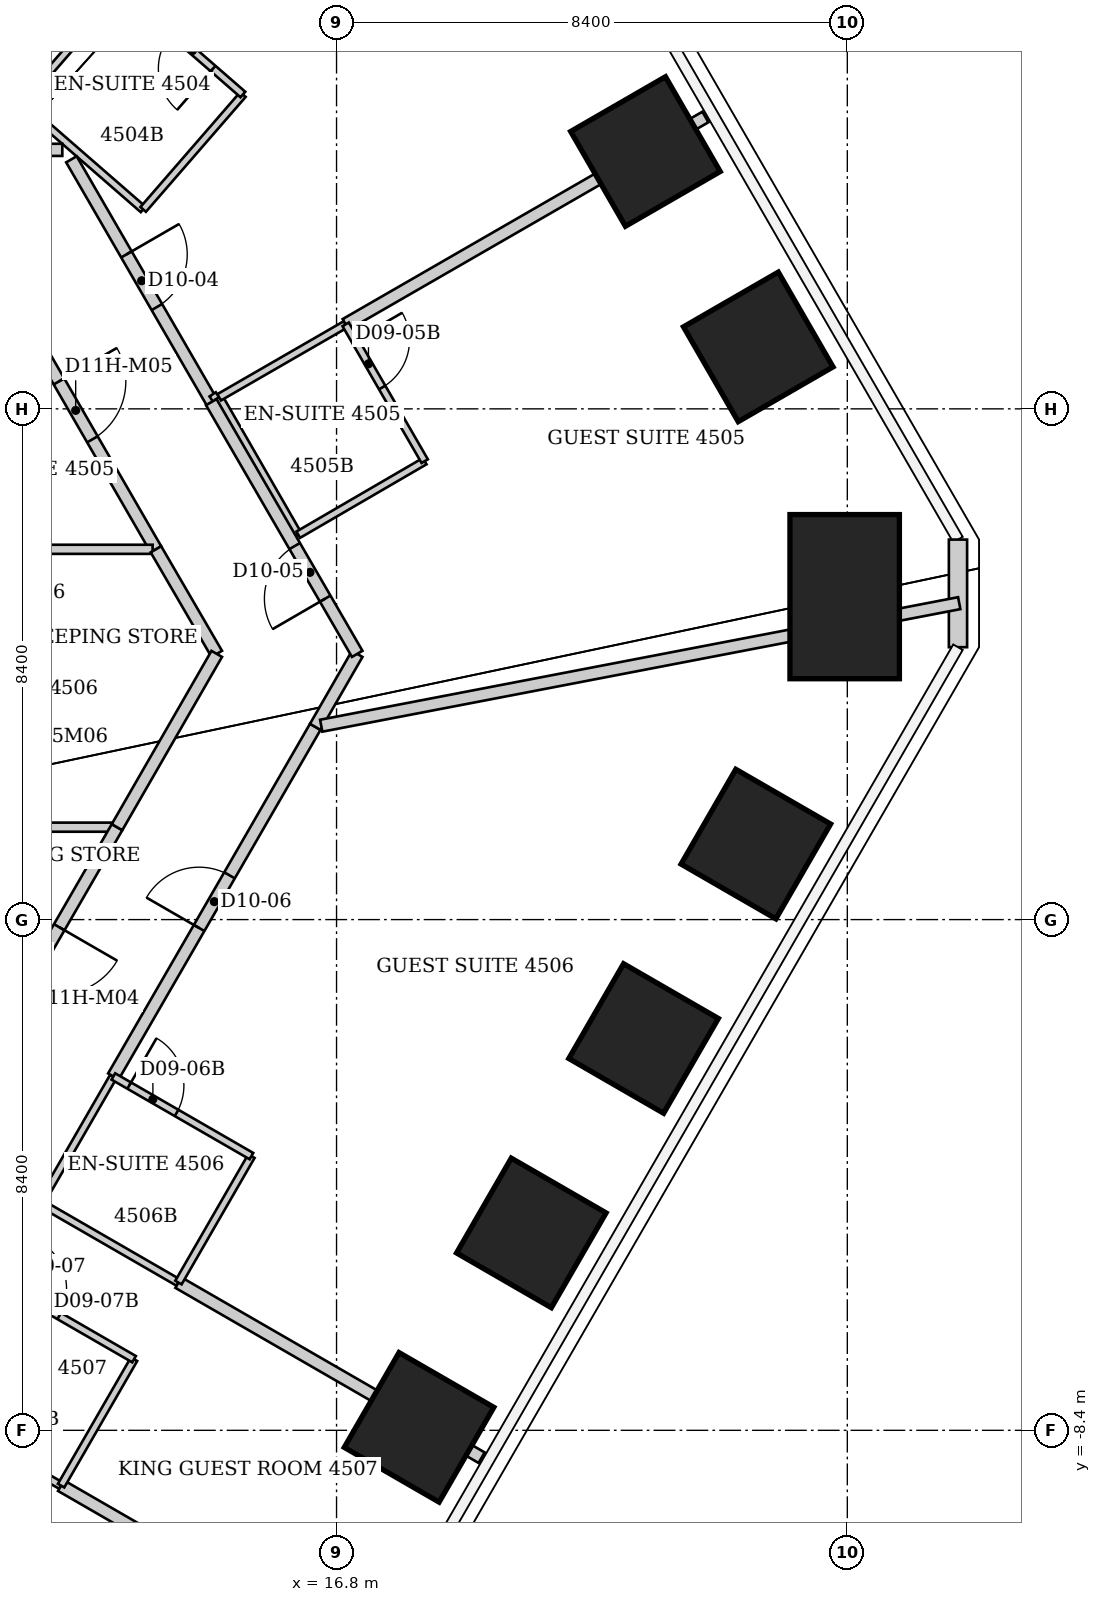
"""IFC4 building model, lengths in metres.
Left out: names, types, materials, properties, quantities, classifications, styles, units other than length and angle.
Written with IfcOpenShell. Run it as: python <this file> out.ifc"""

import sys

from ifc_helpers import new_model, si_unit, direction, frame, frame_2d, origin, origin_2d, place, context, subcontext, project, spatial, rectangle, extrude, element, fill, save


model = new_model("IFC4")
c1 = context("Model", 3, precision=1e-05, world=origin(), true_north=direction((0.0, 1.0)))
c2 = subcontext(c1, "Body", "Model", "MODEL_VIEW")
j1 = project(units=[si_unit("LENGTHUNIT", "METRE"), si_unit("PLANEANGLEUNIT", "RADIAN")], contexts=[c1])
p1 = place(None, origin())
s1 = spatial("IfcSite", under=j1, at=p1, CompositionType="ELEMENT")
p2 = place(p1, origin())
s2 = spatial("IfcBuilding", under=s1, at=p2, CompositionType="ELEMENT")
p3 = place(p2, frame((0.0, 0.0, 183.2)))
s3 = spatial("IfcBuildingStorey", under=s2, at=p3, CompositionType="ELEMENT", Elevation=183.2)
for number, where, z_axis, x_axis in (
    (1, (21.88, 12.633, 0.0), (0.0, 0.0, 1.0), (0.866, 0.5, 0.0)),
    (2, (23.735, 9.419, 0.0), (0.0, 0.0, 1.0), (0.866, 0.5, 0.0)),
):
    element("IfcColumn", number, at=place(p3, frame(where, z_axis=z_axis, x_axis=x_axis)), inside=s3, PredefinedType="COLUMN", context=c2, shape_type="SweptSolid", body=[
        extrude(rectangle(XDim=1.8, YDim=1.8, at=origin_2d()), origin(), (0.0, 0.0, 1.0), 3.8),
    ])
p4 = place(p3, frame((25.156, 5.311, 0.0), z_axis=(0.0, 0.0, 1.0), x_axis=(1.0, 0.0, 0.0)))
e3 = element("IfcColumn", 3, at=p4, inside=s3, PredefinedType="COLUMN", context=c2, shape_type="SweptSolid", body=[
    extrude(rectangle(XDim=1.8, YDim=2.7, at=origin_2d()), origin(), (0.0, 0.0, 1.0), 3.8),
])
for number, where, z_axis, x_axis in (
    (4, (23.696, 1.242, 0.0), (0.0, 0.0, 1.0), (0.866, -0.5, 0.0)),
    (5, (21.85, -1.956, 0.0), (0.0, 0.0, 1.0), (0.866, -0.5, 0.0)),
    (6, (20.003, -5.153, 0.0), (0.0, 0.0, 1.0), (0.866, -0.5, 0.0)),
    (7, (18.157, -8.351, 0.0), (0.0, 0.0, 1.0), (0.866, -0.5, 0.0)),
):
    element("IfcColumn", number, at=place(p3, frame(where, z_axis=z_axis, x_axis=x_axis)), inside=s3, PredefinedType="COLUMN", context=c2, shape_type="SweptSolid", body=[
        extrude(rectangle(XDim=1.8, YDim=1.8, at=origin_2d()), origin(), (0.0, 0.0, 1.0), 3.8),
    ])
p5 = place(p3, frame((27.02, 6.25, 0.0), z_axis=(0.0, 0.0, 1.0), x_axis=(0.0, -1.0, 0.0)))
e8 = element("IfcWall", 8, at=p5, inside=s3, PredefinedType="SOLIDWALL", context=c2, shape_type="SweptSolid", body=[
    extrude(rectangle(XDim=1.77, YDim=0.3, at=frame_2d((0.885, 0.0))), origin(), (0.0, 0.0, 1.0), 3.64),
])
p6 = place(p3, frame((10.0, -8.0, 0.0), z_axis=(0.0, 0.0, 1.0), x_axis=(0.866010296064, -0.500026166427, 0.0)))
e9 = element("IfcWall", 9, at=p6, inside=s3, PredefinedType="PARTITIONING", context=c2, shape_type="SweptSolid", body=[
    extrude(rectangle(XDim=2.621, YDim=0.12, at=frame_2d((1.311, 0.0))), origin(), (0.0, 0.0, 1.0), 3.038),
])
p7 = place(p3, frame((10.55, 1.52, 0.0), z_axis=(0.0, 0.0, 1.0), x_axis=(1.0, 0.0, 0.0)))
e10 = element("IfcWall", 10, at=p7, inside=s3, PredefinedType="PARTITIONING", context=c2, shape_type="SweptSolid", body=[
    extrude(rectangle(XDim=2.585, YDim=0.15, at=frame_2d((1.292, 0.0))), origin(), (0.0, 0.0, 1.0), 3.64),
])
p8 = place(p3, frame((11.19, 10.66, 0.0), z_axis=(0.0, 0.0, 1.0), x_axis=(0.500248310865, -0.865881993967, 0.0)))
e11 = element("IfcWall", 11, at=p8, inside=s3, PredefinedType="PARTITIONING", context=c2, shape_type="SweptSolid", body=[
    extrude(rectangle(XDim=5.278, YDim=0.2, at=frame_2d((2.639, 0.0))), origin(), (0.0, 0.0, 1.0), 3.64),
])
p9 = place(p8, frame((2.089, 0.0, 0.0)))
e12 = element("IfcOpeningElement", 12, at=p9, cuts=e11, PredefinedType="OPENING", context=c2, shape_type="SweptSolid", body=[
    extrude(rectangle(XDim=1.1, YDim=2.2, at=frame_2d((0.55, 1.1))), frame((0.0, 0.1, 0.0), z_axis=(0.0, -1.0, 0.0), x_axis=(1.0, 0.0, 0.0)), (0.0, 0.0, 1.0), 0.2),
])
p10 = place(p3, frame((11.62, 13.42, 0.0), z_axis=(0.0, 0.0, 1.0), x_axis=(0.655335308977, 0.755338091723, 0.0)))
e13 = element("IfcWall", 13, at=p10, inside=s3, PredefinedType="PARTITIONING", context=c2, shape_type="SweptSolid", body=[
    extrude(rectangle(XDim=2.502, YDim=0.12, at=frame_2d((1.251, 0.0))), origin(), (0.0, 0.0, 1.0), 3.64),
])
p11 = place(p3, frame((11.62, 13.42, 0.0), z_axis=(0.0, 0.0, 1.0), x_axis=(0.754444902764, -0.656363381591, 0.0)))
e14 = element("IfcWall", 14, at=p11, inside=s3, PredefinedType="PARTITIONING", context=c2, shape_type="SweptSolid", body=[
    extrude(rectangle(XDim=2.651, YDim=0.12, at=frame_2d((1.325, 0.0))), origin(), (0.0, 0.0, 1.0), 3.64),
])
p12 = place(p3, frame((11.93, -4.66, 0.0), z_axis=(0.0, 0.0, 1.0), x_axis=(0.499737123639, 0.866177122335, 0.0)))
e15 = element("IfcWall", 15, at=p12, inside=s3, PredefinedType="PARTITIONING", context=c2, shape_type="SweptSolid", body=[
    extrude(rectangle(XDim=2.401, YDim=0.12, at=frame_2d((1.201, 0.0))), origin(), (0.0, 0.0, 1.0), 3.64),
])
p13 = place(p3, frame((11.93, -4.66, 0.0), z_axis=(0.0, 0.0, 1.0), x_axis=(0.865969958829, -0.500096021185, 0.0)))
e16 = element("IfcWall", 16, at=p13, inside=s3, PredefinedType="PARTITIONING", context=c2, shape_type="SweptSolid", body=[
    extrude(rectangle(XDim=2.621, YDim=0.12, at=frame_2d((1.311, 0.0))), origin(), (0.0, 0.0, 1.0), 3.038),
])
p14 = place(p3, frame((12.27, -9.311, 0.0), z_axis=(0.0, 0.0, 1.0), x_axis=(0.865985044037, -0.500069898618, 0.0)))
e17 = element("IfcWall", 17, at=p14, inside=s3, PredefinedType="PARTITIONING", context=c2, shape_type="SweptSolid", body=[
    extrude(rectangle(XDim=5.758, YDim=0.2, at=frame_2d((2.879, 0.0))), origin(), (0.0, 0.0, 1.0), 3.038),
])
p15 = place(p3, frame((12.27, -9.31, 0.0), z_axis=(0.0, 0.0, 1.0), x_axis=(0.499693115345, 0.866202511239, 0.0)))
e18 = element("IfcWall", 18, at=p15, inside=s3, PredefinedType="PARTITIONING", context=c2, shape_type="SweptSolid", body=[
    extrude(rectangle(XDim=2.401, YDim=0.12, at=frame_2d((1.201, 0.0))), origin(), (0.0, 0.0, 1.0), 3.64),
])
p16 = place(p3, frame((12.29, 12.66, 0.0), z_axis=(0.0, 0.0, 1.0), x_axis=(-1.0, 0.0, 0.0)))
e19 = element("IfcWall", 19, at=p16, inside=s3, PredefinedType="PARTITIONING", context=c2, shape_type="SweptSolid", body=[
    extrude(rectangle(XDim=1.33, YDim=0.2, at=frame_2d((0.665, 0.0))), origin(), (0.0, 0.0, 1.0), 3.64),
])
p17 = place(p3, frame((12.44, 12.504, 0.0), z_axis=(0.0, 0.0, 1.0), x_axis=(0.500616963614, -0.865668906535, 0.0)))
e20 = element("IfcWall", 20, at=p17, inside=s3, PredefinedType="PARTITIONING", context=c2, shape_type="SweptSolid", body=[
    extrude(rectangle(XDim=4.614, YDim=0.2, at=frame_2d((2.307, 0.0))), origin(), (0.0, 0.0, 1.0), 3.64),
])
p18 = place(p17, frame((1.807, 0.0, 0.0)))
e21 = element("IfcOpeningElement", 21, at=p18, cuts=e20, PredefinedType="OPENING", context=c2, shape_type="SweptSolid", body=[
    extrude(rectangle(XDim=1.0, YDim=2.13, at=frame_2d((0.5, 1.065))), frame((0.0, 0.1, 0.0), z_axis=(0.0, -1.0, 0.0), x_axis=(1.0, 0.0, 0.0)), (0.0, 0.0, 1.0), 0.2),
])
p19 = place(p3, frame((13.13, -2.58, 0.0), z_axis=(0.0, 0.0, 1.0), x_axis=(0.500034373799, 0.866005557153, 0.0)))
e22 = element("IfcWall", 22, at=p19, inside=s3, PredefinedType="PARTITIONING", context=c2, shape_type="SweptSolid", body=[
    extrude(rectangle(XDim=6.64, YDim=0.2, at=frame_2d((3.32, 0.0))), origin(), (0.0, 0.0, 1.0), 3.64),
])
p20 = place(p19, frame((2.82, 0.0, 0.0)))
e23 = element("IfcOpeningElement", 23, at=p20, cuts=e22, PredefinedType="OPENING", context=c2, shape_type="SweptSolid", body=[
    extrude(rectangle(XDim=1.0, YDim=2.13, at=frame_2d((0.5, 1.065))), frame((0.0, 0.1, 0.0), z_axis=(0.0, -1.0, 0.0), x_axis=(1.0, 0.0, 0.0)), (0.0, 0.0, 1.0), 0.2),
])
p21 = place(p3, frame((13.19, 1.52, 0.0), z_axis=(0.0, 0.0, 1.0), x_axis=(-0.500193590286, -0.865913605527, 0.0)))
e24 = element("IfcWall", 24, at=p21, inside=s3, PredefinedType="PARTITIONING", context=c2, shape_type="SweptSolid", body=[
    extrude(rectangle(XDim=5.278, YDim=0.2, at=frame_2d((2.639, 0.0))), origin(), (0.0, 0.0, 1.0), 3.64),
])
p22 = place(p21, frame((1.9, 0.0, 0.0)))
e25 = element("IfcOpeningElement", 25, at=p22, cuts=e24, PredefinedType="OPENING", context=c2, shape_type="SweptSolid", body=[
    extrude(rectangle(XDim=1.1, YDim=2.2, at=frame_2d((0.55, 1.1))), frame((0.0, 0.1, 0.0), z_axis=(0.0, -1.0, 0.0), x_axis=(1.0, 0.0, 0.0)), (0.0, 0.0, 1.0), 0.2),
])
p23 = place(p3, frame((13.47, -7.23, 0.0), z_axis=(0.0, 0.0, 1.0), x_axis=(-0.866114241029, 0.499846097802, 0.0)))
e26 = element("IfcWall", 26, at=p23, inside=s3, PredefinedType="PARTITIONING", context=c2, shape_type="SweptSolid", body=[
    extrude(rectangle(XDim=2.621, YDim=0.12, at=frame_2d((1.311, 0.0))), origin(), (0.0, 0.0, 1.0), 3.64),
])
p24 = place(p23, frame((1.421, 0.0, 0.0)))
e27 = element("IfcOpeningElement", 27, at=p24, cuts=e26, PredefinedType="OPENING", context=c2, shape_type="SweptSolid", body=[
    extrude(rectangle(XDim=0.9, YDim=2.03, at=frame_2d((0.45, 1.015))), frame((0.0, 0.06, 0.0), z_axis=(0.0, -1.0, 0.0), x_axis=(1.0, 0.0, 0.0)), (0.0, 0.0, 1.0), 0.12),
])
p25 = place(p3, frame((13.62, 11.68, 0.0), z_axis=(0.0, 0.0, 1.0), x_axis=(0.655335308977, 0.755338091723, 0.0)))
e28 = element("IfcWall", 28, at=p25, inside=s3, PredefinedType="PARTITIONING", context=c2, shape_type="SweptSolid", body=[
    extrude(rectangle(XDim=2.502, YDim=0.12, at=frame_2d((1.251, 0.0))), origin(), (0.0, 0.0, 1.0), 3.64),
])
p26 = place(p3, frame((13.775, 6.09, 0.0), z_axis=(0.0, 0.0, 1.0), x_axis=(-1.0, 0.0, 0.0)))
e29 = element("IfcWall", 29, at=p26, inside=s3, PredefinedType="PARTITIONING", context=c2, shape_type="SweptSolid", body=[
    extrude(rectangle(XDim=3.225, YDim=0.15, at=frame_2d((1.612, 0.0))), origin(), (0.0, 0.0, 1.0), 3.64),
])
p27 = place(p3, frame((13.83, 6.09, 0.0), z_axis=(0.0, 0.0, 1.0), x_axis=(0.502573539539, -0.864534462792, 0.0)))
e30 = element("IfcWall", 30, at=p27, inside=s3, PredefinedType="PARTITIONING", context=c2, shape_type="SweptSolid", body=[
    extrude(rectangle(XDim=1.99, YDim=0.2, at=frame_2d((0.995, 0.0))), origin(), (0.0, 0.0, 1.0), 3.64),
])
p28 = place(p3, frame((14.2, -5.971, 0.0), z_axis=(0.0, 0.0, 1.0), x_axis=(0.86600340545, -0.500038100297, 0.0)))
e31 = element("IfcWall", 31, at=p28, inside=s3, PredefinedType="PARTITIONING", context=c2, shape_type="SweptSolid", body=[
    extrude(rectangle(XDim=5.758, YDim=0.2, at=frame_2d((2.879, 0.0))), origin(), (0.0, 0.0, 1.0), 3.038),
])
p29 = place(p3, frame((14.2, -5.97, 0.0), z_axis=(0.0, 0.0, 1.0), x_axis=(0.499737123639, 0.866177122335, 0.0)))
e32 = element("IfcWall", 32, at=p29, inside=s3, PredefinedType="PARTITIONING", context=c2, shape_type="SweptSolid", body=[
    extrude(rectangle(XDim=2.401, YDim=0.12, at=frame_2d((1.201, 0.0))), origin(), (0.0, 0.0, 1.0), 3.64),
])
p30 = place(p3, frame((14.767, 8.521, 0.0), z_axis=(0.0, 0.0, 1.0), x_axis=(0.831142316784, 0.55605975331, 0.0)))
e33 = element("IfcWall", 33, at=p30, inside=s3, PredefinedType="PARTITIONING", context=c2, shape_type="SweptSolid", body=[
    extrude(rectangle(XDim=0.124, YDim=0.2, at=frame_2d((0.062, 0.0))), origin(), (0.0, 0.0, 1.0), 3.64),
])
p31 = place(p3, frame((14.83, 4.37, 0.0), z_axis=(0.0, 0.0, 1.0), x_axis=(-0.498775186059, -0.866731396554, 0.0)))
e34 = element("IfcWall", 34, at=p31, inside=s3, PredefinedType="PARTITIONING", context=c2, shape_type="SweptSolid", body=[
    extrude(rectangle(XDim=3.288, YDim=0.2, at=frame_2d((1.644, 0.0))), origin(), (0.0, 0.0, 1.0), 3.64),
])
p32 = place(p3, frame((14.87, 8.59, 0.0), z_axis=(0.0, 0.0, 1.0), x_axis=(0.498557331759, -0.866856728041, 0.0)))
e35 = element("IfcWall", 35, at=p32, inside=s3, PredefinedType="PARTITIONING", context=c2, shape_type="SweptSolid", body=[
    extrude(rectangle(XDim=2.607, YDim=0.12, at=frame_2d((1.304, 0.0))), origin(), (0.0, 0.0, 1.0), 3.64),
])
p33 = place(p3, frame((14.87, 8.59, 0.0), z_axis=(0.0, 0.0, 1.0), x_axis=(0.866177122335, 0.499737123639, 0.0)))
e36 = element("IfcWall", 36, at=p33, inside=s3, PredefinedType="PARTITIONING", context=c2, shape_type="SweptSolid", body=[
    extrude(rectangle(XDim=2.401, YDim=0.12, at=frame_2d((1.201, 0.0))), origin(), (0.0, 0.0, 1.0), 2.878),
])
p34 = place(p3, frame((15.26, 13.57, 0.0), z_axis=(0.0, 0.0, 1.0), x_axis=(-0.754444902764, 0.656363381591, 0.0)))
e37 = element("IfcWall", 37, at=p34, inside=s3, PredefinedType="PARTITIONING", context=c2, shape_type="SweptSolid", body=[
    extrude(rectangle(XDim=2.651, YDim=0.12, at=frame_2d((1.325, 0.0))), origin(), (0.0, 0.0, 1.0), 3.64),
])
p35 = place(p34, frame((0.65, 0.0, 0.0)))
e38 = element("IfcOpeningElement", 38, at=p35, cuts=e37, PredefinedType="OPENING", context=c2, shape_type="SweptSolid", body=[
    extrude(rectangle(XDim=0.9, YDim=2.03, at=frame_2d((0.45, 1.015))), frame((0.0, 0.06, 0.0), z_axis=(0.0, -1.0, 0.0), x_axis=(1.0, 0.0, 0.0)), (0.0, 0.0, 1.0), 0.12),
])
p36 = place(p3, frame((15.4, -3.89, 0.0), z_axis=(0.0, 0.0, 1.0), x_axis=(-0.866154567199, 0.49977621564, 0.0)))
e39 = element("IfcWall", 39, at=p36, inside=s3, PredefinedType="PARTITIONING", context=c2, shape_type="SweptSolid", body=[
    extrude(rectangle(XDim=2.621, YDim=0.12, at=frame_2d((1.311, 0.0))), origin(), (0.0, 0.0, 1.0), 3.64),
])
p37 = place(p36, frame((1.421, 0.0, 0.0)))
e40 = element("IfcOpeningElement", 40, at=p37, cuts=e39, PredefinedType="OPENING", context=c2, shape_type="SweptSolid", body=[
    extrude(rectangle(XDim=0.9, YDim=2.03, at=frame_2d((0.45, 1.015))), frame((0.0, 0.06, 0.0), z_axis=(0.0, -1.0, 0.0), x_axis=(1.0, 0.0, 0.0)), (0.0, 0.0, 1.0), 0.12),
])
p38 = place(p3, frame((16.17, 6.33, 0.0), z_axis=(0.0, 0.0, 1.0), x_axis=(0.864396442809, 0.502810888564, 0.0)))
e41 = element("IfcWall", 41, at=p38, inside=s3, PredefinedType="PARTITIONING", context=c2, shape_type="SweptSolid", body=[
    extrude(rectangle(XDim=2.406, YDim=0.12, at=frame_2d((1.203, 0.0))), origin(), (0.0, 0.0, 1.0), 3.64),
])
p39 = place(p3, frame((16.45, 3.17, 0.0), z_axis=(0.0, 0.0, 1.0), x_axis=(0.49845455473, 0.866915830325, 0.0)))
e42 = element("IfcWall", 42, at=p39, inside=s3, PredefinedType="PARTITIONING", context=c2, shape_type="SweptSolid", body=[
    extrude(rectangle(XDim=1.384, YDim=0.2, at=frame_2d((0.692, 0.0))), origin(), (0.0, 0.0, 1.0), 3.64),
])
p40 = place(p3, frame((16.95, 9.79, 0.0), z_axis=(0.0, 0.0, 1.0), x_axis=(0.866371236465, 0.499400521251, 0.0)))
e43 = element("IfcWall", 43, at=p40, inside=s3, PredefinedType="PARTITIONING", context=c2, shape_type="SweptSolid", body=[
    extrude(rectangle(XDim=6.829, YDim=0.2, at=frame_2d((3.414, 0.0))), origin(), (0.0, 0.0, 1.0), 2.878),
])
p41 = place(p3, frame((17.14, 4.37, 0.0), z_axis=(0.0, 0.0, 1.0), x_axis=(-0.501524901322, 0.865143209737, 0.0)))
e44 = element("IfcWall", 44, at=p41, inside=s3, PredefinedType="PARTITIONING", context=c2, shape_type="SweptSolid", body=[
    extrude(rectangle(XDim=4.785, YDim=0.2, at=frame_2d((2.393, 0.0))), origin(), (0.0, 0.0, 1.0), 3.64),
])
p42 = place(p41, frame((1.05, 0.0, 0.0)))
e45 = element("IfcOpeningElement", 45, at=p42, cuts=e44, PredefinedType="OPENING", context=c2, shape_type="SweptSolid", body=[
    extrude(rectangle(XDim=1.0, YDim=2.13, at=frame_2d((0.5, 1.065))), frame((0.0, 0.1, 0.0), z_axis=(0.0, -1.0, 0.0), x_axis=(1.0, 0.0, 0.0)), (0.0, 0.0, 1.0), 0.2),
])
p43 = place(p3, frame((18.25, 7.54, 0.0), z_axis=(0.0, 0.0, 1.0), x_axis=(-0.500291685314, 0.865856933682, 0.0)))
e46 = element("IfcWall", 46, at=p43, inside=s3, PredefinedType="PARTITIONING", context=c2, shape_type="SweptSolid", body=[
    extrude(rectangle(XDim=2.599, YDim=0.12, at=frame_2d((1.299, 0.0))), origin(), (0.0, 0.0, 1.0), 3.64),
])
p44 = place(p43, frame((1.399, 0.0, 0.0)))
e47 = element("IfcOpeningElement", 47, at=p44, cuts=e46, PredefinedType="OPENING", context=c2, shape_type="SweptSolid", body=[
    extrude(rectangle(XDim=0.9, YDim=2.03, at=frame_2d((0.45, 1.015))), frame((0.0, 0.06, 0.0), z_axis=(0.0, -1.0, 0.0), x_axis=(1.0, 0.0, 0.0)), (0.0, 0.0, 1.0), 0.12),
])
p45 = place(p3, frame((27.041, 5.204, 0.0), z_axis=(0.0, 0.0, 1.0), x_axis=(-0.982047984466, -0.188631270488, 0.0)))
e48 = element("IfcWall", 48, at=p45, inside=s3, PredefinedType="PARTITIONING", context=c2, shape_type="SweptSolid", body=[
    extrude(rectangle(XDim=10.684, YDim=0.2, at=frame_2d((5.342, 0.0))), origin(), (0.0, 0.0, 1.0), 3.64),
])
p46 = place(p18, origin())
e49 = element("IfcDoor", 49, at=p46, inside=s3, OperationType="SINGLE_SWING_LEFT", PredefinedType="DOOR", context=c2, shape_type="SweptSolid", body=[
    extrude(rectangle(XDim=1.0, YDim=2.13, at=frame_2d((0.5, 1.065))), frame((0.0, 0.025, 0.0), z_axis=(0.0, -1.0, 0.0), x_axis=(1.0, 0.0, 0.0)), (0.0, 0.0, 1.0), 0.05),
])
fill(e21, e49)
p47 = place(p35, origin())
e50 = element("IfcDoor", 50, at=p47, inside=s3, OperationType="SINGLE_SWING_LEFT", PredefinedType="DOOR", context=c2, shape_type="SweptSolid", body=[
    extrude(rectangle(XDim=0.9, YDim=2.03, at=frame_2d((0.45, 1.015))), frame((0.0, 0.025, 0.0), z_axis=(0.0, -1.0, 0.0), x_axis=(1.0, 0.0, 0.0)), (0.0, 0.0, 1.0), 0.05),
])
fill(e38, e50)
p48 = place(p42, origin())
e51 = element("IfcDoor", 51, at=p48, inside=s3, OperationType="SINGLE_SWING_LEFT", PredefinedType="DOOR", context=c2, shape_type="SweptSolid", body=[
    extrude(rectangle(XDim=1.0, YDim=2.13, at=frame_2d((0.5, 1.065))), frame((0.0, 0.025, 0.0), z_axis=(0.0, -1.0, 0.0), x_axis=(1.0, 0.0, 0.0)), (0.0, 0.0, 1.0), 0.05),
])
fill(e45, e51)
p49 = place(p44, origin())
e52 = element("IfcDoor", 52, at=p49, inside=s3, OperationType="SINGLE_SWING_RIGHT", PredefinedType="DOOR", context=c2, shape_type="SweptSolid", body=[
    extrude(rectangle(XDim=0.9, YDim=2.03, at=frame_2d((0.45, 1.015))), frame((0.0, 0.025, 0.0), z_axis=(0.0, -1.0, 0.0), x_axis=(1.0, 0.0, 0.0)), (0.0, 0.0, 1.0), 0.05),
])
fill(e47, e52)
p50 = place(p20, origin())
e53 = element("IfcDoor", 53, at=p50, inside=s3, OperationType="SINGLE_SWING_LEFT", PredefinedType="DOOR", context=c2, shape_type="SweptSolid", body=[
    extrude(rectangle(XDim=1.0, YDim=2.13, at=frame_2d((0.5, 1.065))), frame((0.0, 0.025, 0.0), z_axis=(0.0, -1.0, 0.0), x_axis=(1.0, 0.0, 0.0)), (0.0, 0.0, 1.0), 0.05),
])
fill(e23, e53)
p51 = place(p37, origin())
e54 = element("IfcDoor", 54, at=p51, inside=s3, OperationType="SINGLE_SWING_RIGHT", PredefinedType="DOOR", context=c2, shape_type="SweptSolid", body=[
    extrude(rectangle(XDim=0.9, YDim=2.03, at=frame_2d((0.45, 1.015))), frame((0.0, 0.025, 0.0), z_axis=(0.0, -1.0, 0.0), x_axis=(1.0, 0.0, 0.0)), (0.0, 0.0, 1.0), 0.05),
])
fill(e40, e54)
p52 = place(p24, origin())
e55 = element("IfcDoor", 55, at=p52, inside=s3, OperationType="SINGLE_SWING_RIGHT", PredefinedType="DOOR", context=c2, shape_type="SweptSolid", body=[
    extrude(rectangle(XDim=0.9, YDim=2.03, at=frame_2d((0.45, 1.015))), frame((0.0, 0.025, 0.0), z_axis=(0.0, -1.0, 0.0), x_axis=(1.0, 0.0, 0.0)), (0.0, 0.0, 1.0), 0.05),
])
fill(e27, e55)
p53 = place(p22, origin())
e56 = element("IfcDoor", 56, at=p53, inside=s3, OperationType="SINGLE_SWING_LEFT", PredefinedType="DOOR", context=c2, shape_type="SweptSolid", body=[
    extrude(rectangle(XDim=1.1, YDim=2.2, at=frame_2d((0.55, 1.1))), frame((0.0, 0.025, 0.0), z_axis=(0.0, -1.0, 0.0), x_axis=(1.0, 0.0, 0.0)), (0.0, 0.0, 1.0), 0.05),
])
fill(e25, e56)
p54 = place(p9, origin())
e57 = element("IfcDoor", 57, at=p54, inside=s3, OperationType="SINGLE_SWING_LEFT", PredefinedType="DOOR", context=c2, shape_type="SweptSolid", body=[
    extrude(rectangle(XDim=1.1, YDim=2.2, at=frame_2d((0.55, 1.1))), frame((0.0, 0.025, 0.0), z_axis=(0.0, -1.0, 0.0), x_axis=(1.0, 0.0, 0.0)), (0.0, 0.0, 1.0), 0.05),
])
fill(e12, e57)
save(model, sys.argv[1])
